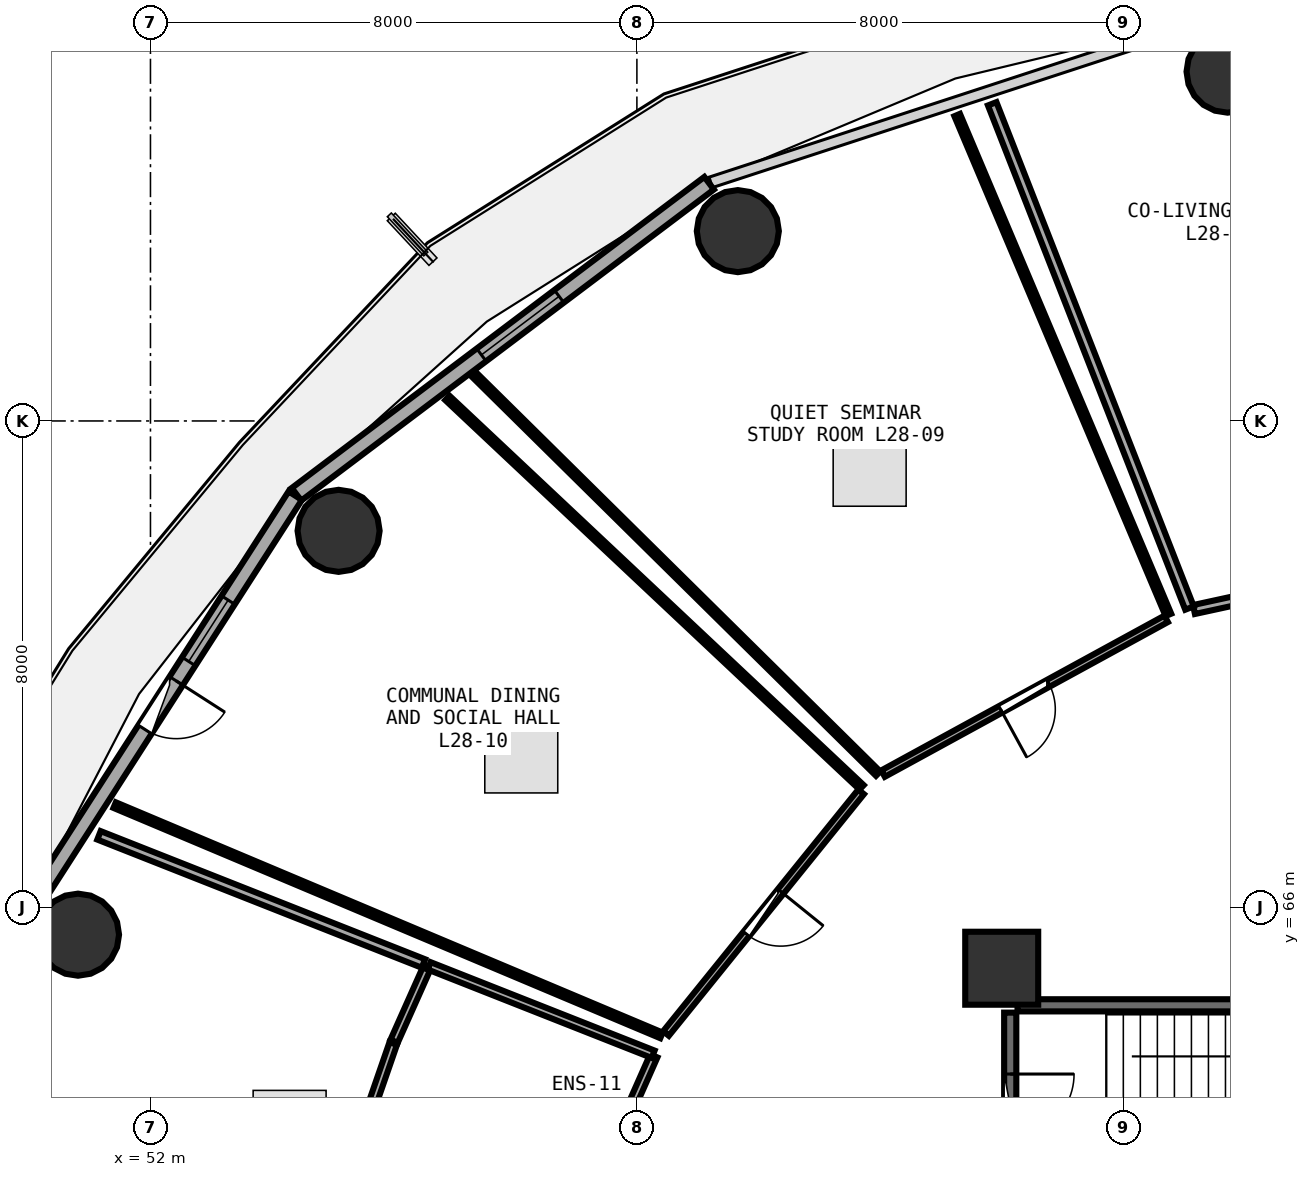
"""IFC4 building model, lengths in metres.
Left out: names, types, materials, properties, quantities, classifications, styles, units other than length and angle.
Written with IfcOpenShell. Run it as: python <this file> out.ifc"""

import sys

from ifc_helpers import new_model, si_unit, direction, frame, frame_2d, origin, origin_2d, place, context, subcontext, project, spatial, rectangle, circle, extrude, element, fill, save


model = new_model("IFC4")
c1 = context("Model", 3, precision=1e-05, world=origin(), true_north=direction((0.0, 1.0)))
c2 = subcontext(c1, "Body", "Model", "MODEL_VIEW")
j1 = project(units=[si_unit("LENGTHUNIT", "METRE"), si_unit("PLANEANGLEUNIT", "RADIAN")], contexts=[c1])
p1 = place(None, origin())
s1 = spatial("IfcSite", under=j1, at=p1, CompositionType="ELEMENT")
p2 = place(p1, origin())
s2 = spatial("IfcBuilding", under=s1, at=p2, CompositionType="ELEMENT")
p3 = place(p2, frame((0.0, 0.0, 110.1)))
s3 = spatial("IfcBuildingStorey", under=s2, at=p3, CompositionType="ELEMENT", Elevation=110.1)
p4 = place(p3, frame((66.0, 65.0, 0.0), z_axis=(0.0, 0.0, 1.0), x_axis=(1.0, 0.0, 0.0)))
e1 = element("IfcColumn", 1, at=p4, inside=s3, PredefinedType="PILASTER", context=c2, shape_type="SweptSolid", body=[
    extrude(rectangle(XDim=1.2, YDim=1.2, at=origin_2d()), origin(), (0.0, 0.0, 1.0), 3.75),
])
for number, where, z_axis, x_axis in (
    (2, (69.714, 79.745, 0.0), (0.0, 0.0, 1.0), (1.0, 0.0, 0.0)),
    (3, (61.66, 77.122, 0.0), (0.0, 0.0, 1.0), (1.0, 0.0, 0.0)),
    (4, (55.094, 72.193, 0.0), (0.0, 0.0, 1.0), (1.0, 0.0, 0.0)),
    (5, (50.808, 65.552, 0.0), (0.0, 0.0, 1.0), (1.0, 0.0, 0.0)),
):
    element("IfcColumn", number, at=place(p3, frame(where, z_axis=z_axis, x_axis=x_axis)), inside=s3, PredefinedType="COLUMN", context=c2, shape_type="SweptSolid", body=[
        extrude(circle(Radius=0.675, at=origin_2d()), origin(), (0.0, 0.0, 1.0), 3.75),
    ])
p5 = place(p3, frame((61.188, 77.91, 0.0), z_axis=(0.0, 0.0, 1.0), x_axis=(-0.798501507879, -0.601992808857, 0.0)))
e6 = element("IfcWall", 6, at=p5, inside=s3, PredefinedType="SOLIDWALL", context=c2, shape_type="SweptSolid", body=[
    extrude(rectangle(XDim=8.499, YDim=0.26, at=frame_2d((4.25, 0.0))), origin(), (0.0, 0.0, 1.0), 3.475),
])
p6 = place(p5, frame((3.09, 0.0, 0.85)))
e7 = element("IfcOpeningElement", 7, at=p6, cuts=e6, PredefinedType="OPENING", context=c2, shape_type="SweptSolid", body=[
    extrude(rectangle(XDim=1.6, YDim=1.45, at=frame_2d((0.8, 0.725))), frame((0.0, 0.14, 0.0), z_axis=(0.0, -1.0, 0.0), x_axis=(1.0, 0.0, 0.0)), (0.0, 0.0, 1.0), 0.28),
])
p7 = place(p3, frame((54.381, 72.771, 0.0), z_axis=(0.0, 0.0, 1.0), x_axis=(-0.540620528459, -0.841266571432, 0.0)))
e8 = element("IfcWall", 8, at=p7, inside=s3, PredefinedType="SOLIDWALL", context=c2, shape_type="SweptSolid", body=[
    extrude(rectangle(XDim=8.193, YDim=0.26, at=frame_2d((4.096, 0.0))), origin(), (0.0, 0.0, 1.0), 3.475),
])
p8 = place(p7, frame((3.621, 0.0, 0.0)))
e9 = element("IfcOpeningElement", 9, at=p8, cuts=e8, PredefinedType="OPENING", context=c2, shape_type="SweptSolid", body=[
    extrude(rectangle(XDim=0.95, YDim=2.1, at=frame_2d((0.475, 1.05))), frame((0.0, 0.14, 0.0), z_axis=(0.0, -1.0, 0.0), x_axis=(1.0, 0.0, 0.0)), (0.0, 0.0, 1.0), 0.28),
])
p9 = place(p7, frame((2.041, 0.0, 0.85)))
e10 = element("IfcOpeningElement", 10, at=p9, cuts=e8, PredefinedType="OPENING", context=c2, shape_type="SweptSolid", body=[
    extrude(rectangle(XDim=1.2, YDim=1.45, at=frame_2d((0.6, 0.725))), frame((0.0, 0.14, 0.0), z_axis=(0.0, -1.0, 0.0), x_axis=(1.0, 0.0, 0.0)), (0.0, 0.0, 1.0), 0.28),
])
p10 = place(p3, frame((73.42, 64.39, 0.0), z_axis=(0.0, 0.0, 1.0), x_axis=(-1.0, 0.0, 0.0)))
e11 = element("IfcWall", 11, at=p10, inside=s3, PredefinedType="SHEAR", context=c2, shape_type="SweptSolid", body=[
    extrude(rectangle(XDim=7.16, YDim=0.2, at=frame_2d((3.58, 0.0))), origin(), (0.0, 0.0, 1.0), 3.49),
])
p11 = place(p3, frame((66.14, 64.27, 0.0), z_axis=(0.0, 0.0, 1.0), x_axis=(0.0, -1.0, 0.0)))
e12 = element("IfcWall", 12, at=p11, inside=s3, PredefinedType="SHEAR", context=c2, shape_type="SweptSolid", body=[
    extrude(rectangle(XDim=3.07, YDim=0.2, at=frame_2d((1.535, 0.0))), origin(), (0.0, 0.0, 1.0), 3.49),
])
p12 = place(p11, frame((1.01, 0.0, 0.0)))
e13 = element("IfcOpeningElement", 13, at=p12, cuts=e12, PredefinedType="OPENING", context=c2, shape_type="SweptSolid", body=[
    extrude(rectangle(XDim=1.05, YDim=2.1, at=frame_2d((0.525, 1.05))), frame((0.0, 0.11, 0.0), z_axis=(0.0, -1.0, 0.0), x_axis=(1.0, 0.0, 0.0)), (0.0, 0.0, 1.0), 0.22),
])
p13 = place(p3, frame((71.868, 71.487, 0.0), z_axis=(0.0, 0.0, 1.0), x_axis=(-0.977162043607, -0.212495507093, 0.0)))
e14 = element("IfcWall", 14, at=p13, inside=s3, PredefinedType="PARTITIONING", context=c2, shape_type="SweptSolid", body=[
    extrude(rectangle(XDim=2.77, YDim=0.15, at=frame_2d((1.385, 0.0))), origin(), (0.0, 0.0, 1.0), 2.925),
])
p14 = place(p13, frame((0.91, 0.0, 0.0)))
e15 = element("IfcOpeningElement", 15, at=p14, cuts=e14, PredefinedType="OPENING", context=c2, shape_type="SweptSolid", body=[
    extrude(rectangle(XDim=0.95, YDim=2.08, at=frame_2d((0.475, 1.04))), frame((0.0, 0.085, 0.0), z_axis=(0.0, -1.0, 0.0), x_axis=(1.0, 0.0, 0.0)), (0.0, 0.0, 1.0), 0.17),
])
p15 = place(p3, frame((68.704, 70.745, 0.0), z_axis=(0.0, 0.0, 1.0), x_axis=(-0.877504886901, -0.479567694351, 0.0)))
e16 = element("IfcWall", 16, at=p15, inside=s3, PredefinedType="PARTITIONING", context=c2, shape_type="SweptSolid", body=[
    extrude(rectangle(XDim=5.306, YDim=0.12, at=frame_2d((2.653, 0.0))), origin(), (0.0, 0.0, 1.0), 2.925),
])
p16 = place(p15, frame((2.203, 0.0, 0.0)))
e17 = element("IfcOpeningElement", 17, at=p16, cuts=e16, PredefinedType="OPENING", context=c2, shape_type="SweptSolid", body=[
    extrude(rectangle(XDim=0.9, YDim=2.08, at=frame_2d((0.45, 1.04))), frame((0.0, 0.07, 0.0), z_axis=(0.0, -1.0, 0.0), x_axis=(1.0, 0.0, 0.0)), (0.0, 0.0, 1.0), 0.14),
])
p17 = place(p3, frame((63.687, 67.9, 0.0), z_axis=(0.0, 0.0, 1.0), x_axis=(-0.628221381111, -0.778034636963, 0.0)))
e18 = element("IfcWall", 18, at=p17, inside=s3, PredefinedType="PARTITIONING", context=c2, shape_type="SweptSolid", body=[
    extrude(rectangle(XDim=5.107, YDim=0.12, at=frame_2d((2.554, 0.0))), origin(), (0.0, 0.0, 1.0), 2.925),
])
p18 = place(p17, frame((2.104, 0.0, 0.0)))
e19 = element("IfcOpeningElement", 19, at=p18, cuts=e18, PredefinedType="OPENING", context=c2, shape_type="SweptSolid", body=[
    extrude(rectangle(XDim=0.9, YDim=2.08, at=frame_2d((0.45, 1.04))), frame((0.0, 0.07, 0.0), z_axis=(0.0, -1.0, 0.0), x_axis=(1.0, 0.0, 0.0)), (0.0, 0.0, 1.0), 0.14),
])
p19 = place(p3, frame((69.088, 70.923, 0.0), z_axis=(0.0, 0.0, 1.0), x_axis=(-0.364389011294, 0.931246824665, 0.0)))
e20 = element("IfcWall", 20, at=p19, inside=s3, PredefinedType="PARTITIONING", context=c2, shape_type="SweptSolid", body=[
    extrude(rectangle(XDim=8.905, YDim=0.15, at=frame_2d((4.453, 0.0))), origin(), (0.0, 0.0, 1.0), 2.975),
])
p20 = place(p3, frame((63.968, 68.2, 0.0), z_axis=(0.0, 0.0, 1.0), x_axis=(-0.711571842372, 0.702613345406, 0.0)))
e21 = element("IfcWall", 21, at=p20, inside=s3, PredefinedType="PARTITIONING", context=c2, shape_type="SweptSolid", body=[
    extrude(rectangle(XDim=9.32, YDim=0.1, at=frame_2d((4.66, 0.0))), origin(), (0.0, 0.0, 1.0), 2.975),
])
p21 = place(p3, frame((65.268, 79.031, 0.0), z_axis=(0.0, 0.0, 1.0), x_axis=(0.389258885466, -0.921128395006, 0.0)))
e22 = element("IfcWall", 22, at=p21, inside=s3, PredefinedType="PARTITIONING", context=c2, shape_type="SweptSolid", body=[
    extrude(rectangle(XDim=8.924, YDim=0.1, at=frame_2d((4.462, 0.0))), origin(), (0.0, 0.0, 1.0), 2.975),
])
p22 = place(p3, frame((60.404, 63.896, 0.0), z_axis=(0.0, 0.0, 1.0), x_axis=(-0.921616535876, 0.388101740268, 0.0)))
e23 = element("IfcWall", 23, at=p22, inside=s3, PredefinedType="PARTITIONING", context=c2, shape_type="SweptSolid", body=[
    extrude(rectangle(XDim=9.758, YDim=0.1, at=frame_2d((4.879, 0.0))), origin(), (0.0, 0.0, 1.0), 2.925),
])
p23 = place(p3, frame((56.883, 74.379, 0.0), z_axis=(0.0, 0.0, 1.0), x_axis=(0.728610729356, -0.684928029115, 0.0)))
e24 = element("IfcWall", 24, at=p23, inside=s3, PredefinedType="PARTITIONING", context=c2, shape_type="SweptSolid", body=[
    extrude(rectangle(XDim=9.35, YDim=0.1, at=frame_2d((4.675, 0.0))), origin(), (0.0, 0.0, 1.0), 2.975),
])
p24 = place(p3, frame((60.278, 63.56, 0.0), z_axis=(0.0, 0.0, 1.0), x_axis=(-0.405022792184, -0.91430658852, 0.0)))
e25 = element("IfcWall", 25, at=p24, inside=s3, PredefinedType="PLUMBINGWALL", context=c2, shape_type="SweptSolid", body=[
    extrude(rectangle(XDim=1.056, YDim=0.13, at=frame_2d((0.528, 0.0))), origin(), (0.0, 0.0, 1.0), 3.235),
])
p25 = place(p3, frame((55.554, 62.498, 0.0), z_axis=(0.0, 0.0, 1.0), x_axis=(0.327317350081, 0.944914468265, 0.0)))
e26 = element("IfcWall", 26, at=p25, inside=s3, PredefinedType="PLUMBINGWALL", context=c2, shape_type="SweptSolid", body=[
    extrude(rectangle(XDim=1.338, YDim=0.13, at=frame_2d((0.669, 0.0))), origin(), (0.0, 0.0, 1.0), 3.48),
])
p26 = place(p3, frame((56.007, 63.799, 0.0), z_axis=(0.0, 0.0, 1.0), x_axis=(0.407618441725, 0.913152345431, 0.0)))
e27 = element("IfcWall", 27, at=p26, inside=s3, PredefinedType="PLUMBINGWALL", context=c2, shape_type="SweptSolid", body=[
    extrude(rectangle(XDim=1.346, YDim=0.13, at=frame_2d((0.673, 0.0))), origin(), (0.0, 0.0, 1.0), 3.48),
])
p27 = place(p3, frame((56.583, 65.04, 0.0), z_axis=(0.0, 0.0, 1.0), x_axis=(0.930150236363, -0.367179163072, 0.0)))
e28 = element("IfcWall", 28, at=p27, inside=s3, PredefinedType="PLUMBINGWALL", context=c2, shape_type="SweptSolid", body=[
    extrude(rectangle(XDim=3.961, YDim=0.13, at=frame_2d((1.981, 0.0))), origin(), (0.0, 0.0, 1.0), 3.175),
])
p28 = place(p3, frame((51.153, 67.185, 0.0), z_axis=(0.0, 0.0, 1.0), x_axis=(0.930084837922, -0.367344789358, 0.0)))
e29 = element("IfcWall", 29, at=p28, inside=s3, PredefinedType="PARTITIONING", context=c2, shape_type="SweptSolid", body=[
    extrude(rectangle(XDim=5.738, YDim=0.15, at=frame_2d((2.869, 0.0))), origin(), (0.0, 0.0, 1.0), 2.925),
])
p29 = place(p6, origin())
e30 = element("IfcWindow", 30, at=p29, inside=s3, PartitioningType="SINGLE_PANEL", PredefinedType="WINDOW", context=c2, shape_type="SweptSolid", body=[
    extrude(rectangle(XDim=1.6, YDim=1.45, at=frame_2d((0.8, 0.725))), frame((0.0, 0.03, 0.0), z_axis=(0.0, -1.0, 0.0), x_axis=(1.0, 0.0, 0.0)), (0.0, 0.0, 1.0), 0.06),
])
fill(e7, e30)
p30 = place(p8, frame((0.95, 0.0, 0.0), z_axis=(0.0, 0.0, 1.0), x_axis=(-1.0, 0.0, 0.0)))
e31 = element("IfcDoor", 31, at=p30, inside=s3, OperationType="SINGLE_SWING_RIGHT", PredefinedType="DOOR", context=c2, shape_type="SweptSolid", body=[
    extrude(rectangle(XDim=0.95, YDim=2.1, at=frame_2d((0.475, 1.05))), frame((0.0, 0.025, 0.0), z_axis=(0.0, -1.0, 0.0), x_axis=(1.0, 0.0, 0.0)), (0.0, 0.0, 1.0), 0.05),
])
fill(e9, e31)
p31 = place(p9, origin())
e32 = element("IfcWindow", 32, at=p31, inside=s3, PartitioningType="SINGLE_PANEL", PredefinedType="WINDOW", context=c2, shape_type="SweptSolid", body=[
    extrude(rectangle(XDim=1.2, YDim=1.45, at=frame_2d((0.6, 0.725))), frame((0.0, 0.03, 0.0), z_axis=(0.0, -1.0, 0.0), x_axis=(1.0, 0.0, 0.0)), (0.0, 0.0, 1.0), 0.06),
])
fill(e10, e32)
p32 = place(p12, origin())
e33 = element("IfcDoor", 33, at=p32, inside=s3, OperationType="SINGLE_SWING_LEFT", PredefinedType="DOOR", context=c2, shape_type="SweptSolid", body=[
    extrude(rectangle(XDim=1.05, YDim=2.1, at=frame_2d((0.525, 1.05))), frame((0.0, 0.025, 0.0), z_axis=(0.0, -1.0, 0.0), x_axis=(1.0, 0.0, 0.0)), (0.0, 0.0, 1.0), 0.05),
])
fill(e13, e33)
p33 = place(p16, origin())
e34 = element("IfcDoor", 34, at=p33, inside=s3, OperationType="SINGLE_SWING_RIGHT", PredefinedType="DOOR", context=c2, shape_type="SweptSolid", body=[
    extrude(rectangle(XDim=0.9, YDim=2.08, at=frame_2d((0.45, 1.04))), frame((0.0, 0.025, 0.0), z_axis=(0.0, -1.0, 0.0), x_axis=(1.0, 0.0, 0.0)), (0.0, 0.0, 1.0), 0.05),
])
fill(e17, e34)
p34 = place(p18, origin())
e35 = element("IfcDoor", 35, at=p34, inside=s3, OperationType="SINGLE_SWING_LEFT", PredefinedType="DOOR", context=c2, shape_type="SweptSolid", body=[
    extrude(rectangle(XDim=0.9, YDim=2.08, at=frame_2d((0.45, 1.04))), frame((0.0, 0.025, 0.0), z_axis=(0.0, -1.0, 0.0), x_axis=(1.0, 0.0, 0.0)), (0.0, 0.0, 1.0), 0.05),
])
fill(e19, e35)
save(model, sys.argv[1])
